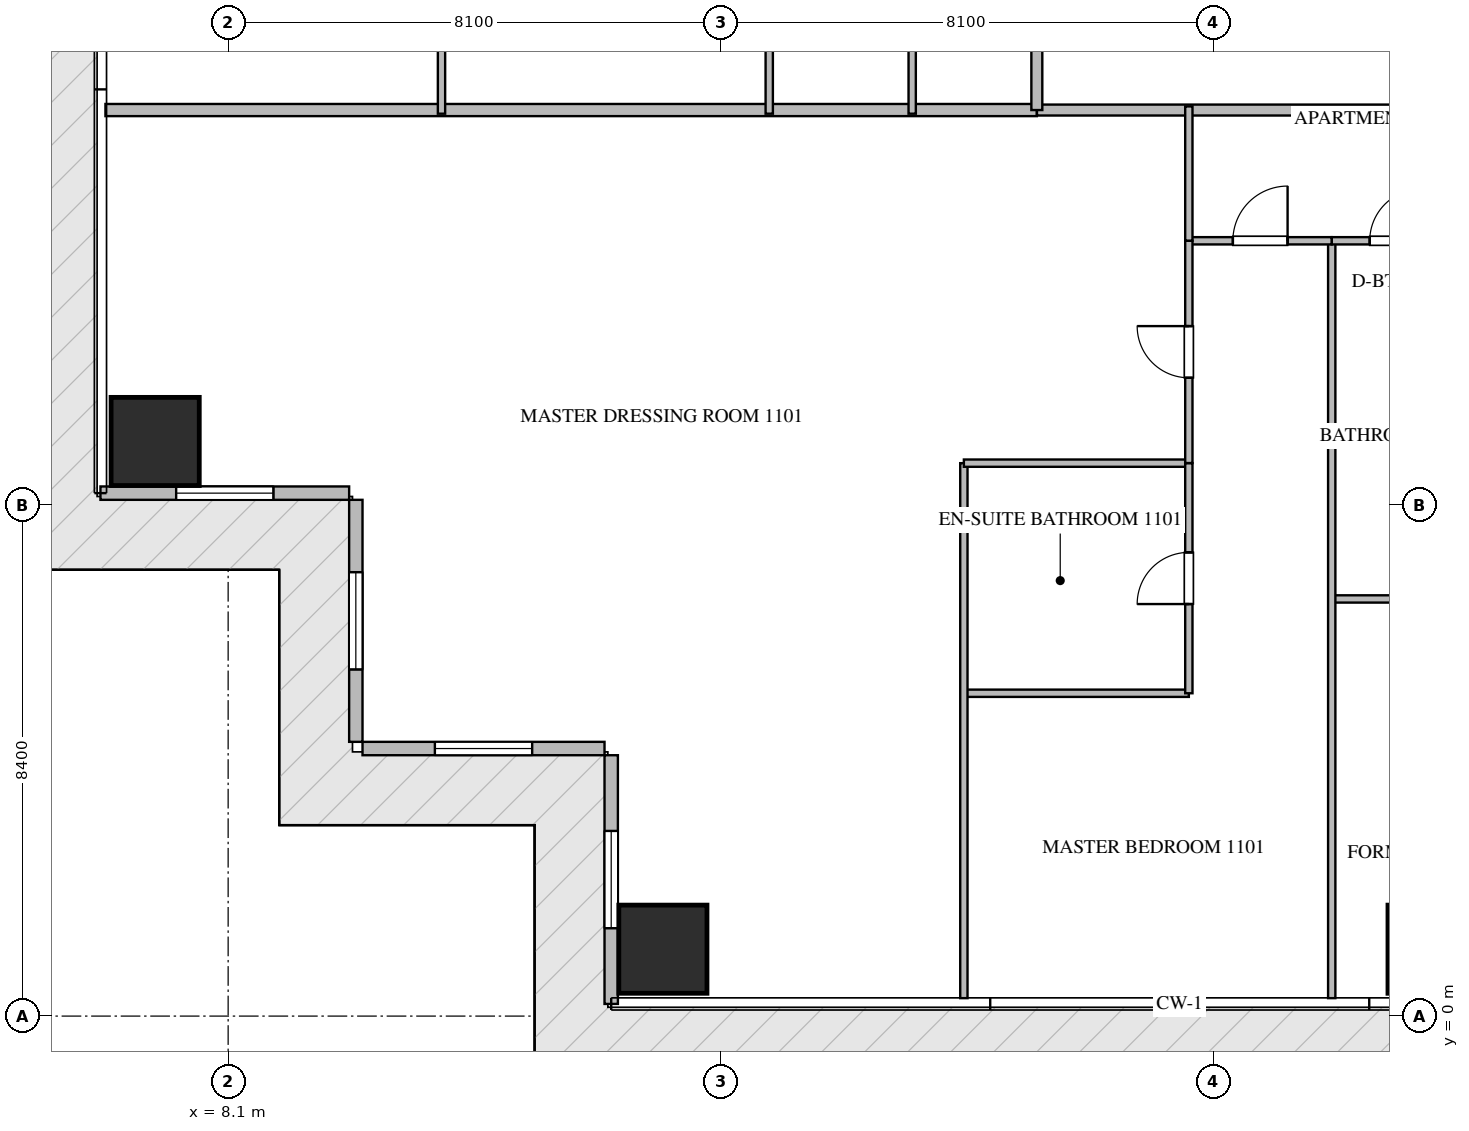
"""IFC4 building model, lengths in metres.
Left out: names, types, materials, properties, quantities, classifications, styles, units other than length and angle.
Written with IfcOpenShell. Run it as: python <this file> out.ifc"""

import sys

from ifc_helpers import new_model, si_unit, direction, frame, frame_2d, origin, origin_2d, place, context, subcontext, project, spatial, rectangle, extrude, source, transform, mapped, element, fill, save


model = new_model("IFC4")
c1 = context("Model", 3, precision=1e-05, world=origin(), true_north=direction((0.0, 1.0)))
c2 = subcontext(c1, "Body", "Model", "MODEL_VIEW")
j1 = project(units=[si_unit("LENGTHUNIT", "METRE"), si_unit("PLANEANGLEUNIT", "RADIAN")], contexts=[c1])
p1 = place(None, origin())
s1 = spatial("IfcSite", under=j1, at=p1, CompositionType="ELEMENT")
p2 = place(p1, origin())
s2 = spatial("IfcBuilding", under=s1, at=p2, CompositionType="ELEMENT")
p3 = place(p2, frame((0.0, 0.0, 49.2)))
s3 = spatial("IfcBuildingStorey", under=s2, at=p3, CompositionType="ELEMENT", Elevation=49.2)
m1 = source(origin(), c2, "Body", "SweptSolid", [
    extrude(rectangle(XDim=1.45, YDim=1.45, at=origin_2d()), origin(), (0.0, 0.0, 1.0), 3.75),
])
for number, where, z_axis, x_axis in (
    (1, (15.25, 1.1, -0.26), (0.0, 0.0, 1.0), (1.0, 0.0, 0.0)),
    (2, (27.9, 1.1, -0.26), (0.0, 0.0, 1.0), (1.0, 0.0, 0.0)),
    (3, (6.9, 9.45, -0.26), (0.0, 0.0, 1.0), (1.0, 0.0, 0.0)),
):
    element("IfcColumn", number, at=place(p3, frame(where, z_axis=z_axis, x_axis=x_axis)), inside=s3, PredefinedType="COLUMN", context=c2, shape_type="MappedRepresentation", body=[
        mapped(m1, transform((0.0, 0.0, 0.0), scale=1.0)),
    ])
p4 = place(p3, frame((6.0, 8.6, 0.0), z_axis=(0.0, 0.0, 1.0), x_axis=(1.0, 0.0, 0.0)))
e4 = element("IfcWall", 4, at=p4, inside=s3, PredefinedType="ELEMENTEDWALL", context=c2, shape_type="SweptSolid", body=[
    extrude(rectangle(XDim=4.09, YDim=0.22, at=frame_2d((2.045, 0.0))), origin(), (0.0, 0.0, 1.0), 3.475),
])
p5 = place(p4, frame((1.245, 0.0, 0.65)))
e5 = element("IfcOpeningElement", 5, at=p5, cuts=e4, PredefinedType="OPENING", context=c2, shape_type="SweptSolid", body=[
    extrude(rectangle(XDim=1.6, YDim=2.1, at=frame_2d((0.8, 1.05))), frame((0.0, 0.12, 0.0), z_axis=(0.0, -1.0, 0.0), x_axis=(1.0, 0.0, 0.0)), (0.0, 0.0, 1.0), 0.24),
])
p6 = place(p3, frame((10.2, 8.49, 0.0), z_axis=(0.0, 0.0, 1.0), x_axis=(0.0, -1.0, 0.0)))
e6 = element("IfcWall", 6, at=p6, inside=s3, PredefinedType="ELEMENTEDWALL", context=c2, shape_type="SweptSolid", body=[
    extrude(rectangle(XDim=3.98, YDim=0.22, at=frame_2d((1.99, 0.0))), origin(), (0.0, 0.0, 1.0), 3.475),
])
p7 = place(p6, frame((1.19, 0.0, 0.65)))
e7 = element("IfcOpeningElement", 7, at=p7, cuts=e6, PredefinedType="OPENING", context=c2, shape_type="SweptSolid", body=[
    extrude(rectangle(XDim=1.6, YDim=2.1, at=frame_2d((0.8, 1.05))), frame((0.0, 0.12, 0.0), z_axis=(0.0, -1.0, 0.0), x_axis=(1.0, 0.0, 0.0)), (0.0, 0.0, 1.0), 0.24),
])
p8 = place(p3, frame((10.31, 4.4, 0.0), z_axis=(0.0, 0.0, 1.0), x_axis=(1.0, 0.0, 0.0)))
e8 = element("IfcWall", 8, at=p8, inside=s3, PredefinedType="ELEMENTEDWALL", context=c2, shape_type="SweptSolid", body=[
    extrude(rectangle(XDim=3.98, YDim=0.22, at=frame_2d((1.99, 0.0))), origin(), (0.0, 0.0, 1.0), 3.475),
])
p9 = place(p8, frame((1.19, 0.0, 0.65)))
e9 = element("IfcOpeningElement", 9, at=p9, cuts=e8, PredefinedType="OPENING", context=c2, shape_type="SweptSolid", body=[
    extrude(rectangle(XDim=1.6, YDim=2.1, at=frame_2d((0.8, 1.05))), frame((0.0, 0.12, 0.0), z_axis=(0.0, -1.0, 0.0), x_axis=(1.0, 0.0, 0.0)), (0.0, 0.0, 1.0), 0.24),
])
p10 = place(p3, frame((14.4, 4.29, 0.0), z_axis=(0.0, 0.0, 1.0), x_axis=(0.0, -1.0, 0.0)))
e10 = element("IfcWall", 10, at=p10, inside=s3, PredefinedType="ELEMENTEDWALL", context=c2, shape_type="SweptSolid", body=[
    extrude(rectangle(XDim=4.09, YDim=0.22, at=frame_2d((2.045, 0.0))), origin(), (0.0, 0.0, 1.0), 3.475),
])
p11 = place(p10, frame((1.245, 0.0, 0.65)))
e11 = element("IfcOpeningElement", 11, at=p11, cuts=e10, PredefinedType="OPENING", context=c2, shape_type="SweptSolid", body=[
    extrude(rectangle(XDim=1.6, YDim=2.1, at=frame_2d((0.8, 1.05))), frame((0.0, 0.12, 0.0), z_axis=(0.0, -1.0, 0.0), x_axis=(1.0, 0.0, 0.0)), (0.0, 0.0, 1.0), 0.24),
])
p12 = place(p3, frame((6.082, 14.9, 0.0), z_axis=(0.0, 0.0, 1.0), x_axis=(1.0, 0.0, 0.0)))
e12 = element("IfcWall", 12, at=p12, inside=s3, PredefinedType="PARTITIONING", context=c2, shape_type="SweptSolid", body=[
    extrude(rectangle(XDim=15.318, YDim=0.2, at=frame_2d((7.659, 0.0))), origin(), (0.0, 0.0, 1.0), 3.49),
])
p13 = place(p3, frame((21.402, 14.9, 0.0), z_axis=(0.0, 0.0, 1.0), x_axis=(1.0, 0.0, 0.0)))
e13 = element("IfcWall", 13, at=p13, inside=s3, PredefinedType="PARTITIONING", context=c2, shape_type="SweptSolid", body=[
    extrude(rectangle(XDim=21.996, YDim=0.18, at=frame_2d((10.998, 0.0))), origin(), (0.0, 0.0, 1.0), 3.49),
])
p14 = place(p13, frame((15.222, 0.0, 0.0)))
e14 = element("IfcOpeningElement", 14, at=p14, cuts=e13, PredefinedType="OPENING", context=c2, shape_type="SweptSolid", body=[
    extrude(rectangle(XDim=1.0, YDim=2.15, at=frame_2d((0.5, 1.075))), frame((0.0, 0.1, 0.0), z_axis=(0.0, -1.0, 0.0), x_axis=(1.0, 0.0, 0.0)), (0.0, 0.0, 1.0), 0.2),
])
p15 = place(p3, frame((21.4, 14.9, 0.0), z_axis=(0.0, 0.0, 1.0), x_axis=(0.0, 1.0, 0.0)))
e15 = element("IfcWall", 15, at=p15, inside=s3, PredefinedType="PARTITIONING", context=c2, shape_type="SweptSolid", body=[
    extrude(rectangle(XDim=20.6, YDim=0.18, at=frame_2d((10.3, 0.0))), origin(), (0.0, 0.0, 1.0), 3.49),
])
p16 = place(p15, frame((8.8, 0.0, 0.0)))
e16 = element("IfcOpeningElement", 16, at=p16, cuts=e15, PredefinedType="OPENING", context=c2, shape_type="SweptSolid", body=[
    extrude(rectangle(XDim=1.0, YDim=2.15, at=frame_2d((0.5, 1.075))), frame((0.0, 0.1, 0.0), z_axis=(0.0, -1.0, 0.0), x_axis=(1.0, 0.0, 0.0)), (0.0, 0.0, 1.0), 0.2),
])
p17 = place(p15, frame((13.877, 0.0, 0.0)))
e17 = element("IfcOpeningElement", 17, at=p17, cuts=e15, PredefinedType="OPENING", context=c2, shape_type="SweptSolid", body=[
    extrude(rectangle(XDim=1.0, YDim=2.15, at=frame_2d((0.5, 1.075))), frame((0.0, 0.1, 0.0), z_axis=(0.0, -1.0, 0.0), x_axis=(1.0, 0.0, 0.0)), (0.0, 0.0, 1.0), 0.2),
])
p18 = place(p3, frame((26.25, 6.86, 0.0), z_axis=(0.0, 0.0, 1.0), x_axis=(1.0, 0.0, 0.0)))
e18 = element("IfcWall", 18, at=p18, inside=s3, PredefinedType="PARTITIONING", context=c2, shape_type="SweptSolid", body=[
    extrude(rectangle(XDim=5.15, YDim=0.12, at=frame_2d((2.575, 0.0))), origin(), (0.0, 0.0, 1.0), 3.49),
])
p19 = place(p3, frame((26.25, 0.295, 0.0), z_axis=(0.0, 0.0, 1.0), x_axis=(0.0, 1.0, 0.0)))
e19 = element("IfcWall", 19, at=p19, inside=s3, PredefinedType="PARTITIONING", context=c2, shape_type="SweptSolid", body=[
    extrude(rectangle(XDim=12.455, YDim=0.12, at=frame_2d((6.228, 0.0))), origin(), (0.0, 0.0, 1.0), 3.49),
])
p20 = place(p3, frame((26.25, 12.75, 0.0), z_axis=(0.0, 0.0, 1.0), x_axis=(1.0, 0.0, 0.0)))
e20 = element("IfcWall", 20, at=p20, inside=s3, PredefinedType="PARTITIONING", context=c2, shape_type="SweptSolid", body=[
    extrude(rectangle(XDim=2.1, YDim=0.12, at=frame_2d((1.05, 0.0))), origin(), (0.0, 0.0, 1.0), 3.49),
])
p21 = place(p20, frame((0.625, 0.0, 0.0)))
e21 = element("IfcOpeningElement", 21, at=p21, cuts=e20, PredefinedType="OPENING", context=c2, shape_type="SweptSolid", body=[
    extrude(rectangle(XDim=0.85, YDim=2.1, at=frame_2d((0.425, 1.05))), frame((0.0, 0.07, 0.0), z_axis=(0.0, -1.0, 0.0), x_axis=(1.0, 0.0, 0.0)), (0.0, 0.0, 1.0), 0.14),
])
p22 = place(p3, frame((23.9, 12.75, 0.0), z_axis=(0.0, 0.0, 1.0), x_axis=(1.0, 0.0, 0.0)))
e22 = element("IfcWall", 22, at=p22, inside=s3, PredefinedType="PARTITIONING", context=c2, shape_type="SweptSolid", body=[
    extrude(rectangle(XDim=2.348, YDim=0.12, at=frame_2d((1.174, 0.0))), origin(), (0.0, 0.0, 1.0), 3.49),
])
p23 = place(p22, frame((0.724, 0.0, 0.0)))
e23 = element("IfcOpeningElement", 23, at=p23, cuts=e22, PredefinedType="OPENING", context=c2, shape_type="SweptSolid", body=[
    extrude(rectangle(XDim=0.9, YDim=2.1, at=frame_2d((0.45, 1.05))), frame((0.0, 0.07, 0.0), z_axis=(0.0, -1.0, 0.0), x_axis=(1.0, 0.0, 0.0)), (0.0, 0.0, 1.0), 0.14),
])
p24 = place(p3, frame((20.2, 5.309, 0.0), z_axis=(0.0, 0.0, 1.0), x_axis=(1.0, 0.0, 0.0)))
e24 = element("IfcWall", 24, at=p24, inside=s3, PredefinedType="PARTITIONING", context=c2, shape_type="SweptSolid", body=[
    extrude(rectangle(XDim=3.7, YDim=0.12, at=frame_2d((1.85, 0.0))), origin(), (0.0, 0.0, 1.0), 3.49),
])
p25 = place(p3, frame((20.2, 0.295, 0.0), z_axis=(0.0, 0.0, 1.0), x_axis=(0.0, 1.0, 0.0)))
e25 = element("IfcWall", 25, at=p25, inside=s3, PredefinedType="PARTITIONING", context=c2, shape_type="SweptSolid", body=[
    extrude(rectangle(XDim=8.798, YDim=0.12, at=frame_2d((4.399, 0.0))), origin(), (0.0, 0.0, 1.0), 3.49),
])
p26 = place(p3, frame((20.2, 9.093, 0.0), z_axis=(0.0, 0.0, 1.0), x_axis=(1.0, 0.0, 0.0)))
e26 = element("IfcWall", 26, at=p26, inside=s3, PredefinedType="PARTITIONING", context=c2, shape_type="SweptSolid", body=[
    extrude(rectangle(XDim=3.7, YDim=0.12, at=frame_2d((1.85, 0.0))), origin(), (0.0, 0.0, 1.0), 3.49),
])
p27 = place(p3, frame((23.9, 5.309, 0.0), z_axis=(0.0, 0.0, 1.0), x_axis=(0.0, 1.0, 0.0)))
e27 = element("IfcWall", 27, at=p27, inside=s3, PredefinedType="PARTITIONING", context=c2, shape_type="SweptSolid", body=[
    extrude(rectangle(XDim=3.784, YDim=0.12, at=frame_2d((1.892, 0.0))), origin(), (0.0, 0.0, 1.0), 3.49),
])
p28 = place(p27, frame((1.467, 0.0, 0.0)))
e28 = element("IfcOpeningElement", 28, at=p28, cuts=e27, PredefinedType="OPENING", context=c2, shape_type="SweptSolid", body=[
    extrude(rectangle(XDim=0.85, YDim=2.1, at=frame_2d((0.425, 1.05))), frame((0.0, 0.07, 0.0), z_axis=(0.0, -1.0, 0.0), x_axis=(1.0, 0.0, 0.0)), (0.0, 0.0, 1.0), 0.14),
])
p29 = place(p3, frame((23.9, 9.095, 0.0), z_axis=(0.0, 0.0, 1.0), x_axis=(0.0, 1.0, 0.0)))
e29 = element("IfcWall", 29, at=p29, inside=s3, PredefinedType="PARTITIONING", context=c2, shape_type="SweptSolid", body=[
    extrude(rectangle(XDim=3.655, YDim=0.12, at=frame_2d((1.828, 0.0))), origin(), (0.0, 0.0, 1.0), 3.49),
])
p30 = place(p29, frame((1.402, 0.0, 0.0)))
e30 = element("IfcOpeningElement", 30, at=p30, cuts=e29, PredefinedType="OPENING", context=c2, shape_type="SweptSolid", body=[
    extrude(rectangle(XDim=0.85, YDim=2.1, at=frame_2d((0.425, 1.05))), frame((0.0, 0.07, 0.0), z_axis=(0.0, -1.0, 0.0), x_axis=(1.0, 0.0, 0.0)), (0.0, 0.0, 1.0), 0.14),
])
p31 = place(p3, frame((23.9, 12.752, 0.0), z_axis=(0.0, 0.0, 1.0), x_axis=(0.0, 1.0, 0.0)))
e31 = element("IfcWall", 31, at=p31, inside=s3, PredefinedType="PARTITIONING", context=c2, shape_type="SweptSolid", body=[
    extrude(rectangle(XDim=2.208, YDim=0.12, at=frame_2d((1.104, 0.0))), origin(), (0.0, 0.0, 1.0), 3.49),
])
for number, where, z_axis, x_axis in (
    (32, (11.609, 14.84, 0.0), (0.0, 0.0, 1.0), (0.0, 1.0, 0.0)),
    (33, (16.999, 14.84, 0.0), (0.0, 0.0, 1.0), (0.0, 1.0, 0.0)),
    (34, (19.35, 14.84, 0.0), (0.0, 0.0, 1.0), (0.0, 1.0, 0.0)),
):
    element("IfcWall", number, at=place(p3, frame(where, z_axis=z_axis, x_axis=x_axis)), inside=s3, PredefinedType="PARTITIONING", context=c2, shape_type="SweptSolid", body=[
        extrude(rectangle(XDim=7.76, YDim=0.12, at=frame_2d((3.88, 0.0))), origin(), (0.0, 0.0, 1.0), 3.49),
    ])
m2 = source(origin(), c2, "Body", "SweptSolid", [
    extrude(rectangle(XDim=1.6, YDim=2.1, at=frame_2d((0.8, 1.05))), frame((0.0, 0.03, 0.0), z_axis=(0.0, -1.0, 0.0), x_axis=(1.0, 0.0, 0.0)), (0.0, 0.0, 1.0), 0.06),
])
p32 = place(p5, origin())
e35 = element("IfcWindow", 35, at=p32, inside=s3, PartitioningType="SINGLE_PANEL", PredefinedType="WINDOW", context=c2, shape_type="MappedRepresentation", body=[
    mapped(m2, transform((0.0, 0.0, 0.0), scale=1.0)),
])
fill(e5, e35)
p33 = place(p7, origin())
e36 = element("IfcWindow", 36, at=p33, inside=s3, PartitioningType="SINGLE_PANEL", PredefinedType="WINDOW", context=c2, shape_type="MappedRepresentation", body=[
    mapped(m2, transform((0.0, 0.0, 0.0), scale=1.0)),
])
fill(e7, e36)
p34 = place(p9, origin())
e37 = element("IfcWindow", 37, at=p34, inside=s3, PartitioningType="SINGLE_PANEL", PredefinedType="WINDOW", context=c2, shape_type="MappedRepresentation", body=[
    mapped(m2, transform((0.0, 0.0, 0.0), scale=1.0)),
])
fill(e9, e37)
p35 = place(p11, origin())
e38 = element("IfcWindow", 38, at=p35, inside=s3, PartitioningType="SINGLE_PANEL", PredefinedType="WINDOW", context=c2, shape_type="MappedRepresentation", body=[
    mapped(m2, transform((0.0, 0.0, 0.0), scale=1.0)),
])
fill(e11, e38)
m3 = source(origin(), c2, "Body", "SweptSolid", [
    extrude(rectangle(XDim=0.85, YDim=2.1, at=frame_2d((0.425, 1.05))), frame((0.0, 0.025, 0.0), z_axis=(0.0, -1.0, 0.0), x_axis=(1.0, 0.0, 0.0)), (0.0, 0.0, 1.0), 0.05),
])
p36 = place(p21, origin())
e39 = element("IfcDoor", 39, at=p36, inside=s3, OperationType="SINGLE_SWING_RIGHT", PredefinedType="DOOR", context=c2, shape_type="MappedRepresentation", body=[
    mapped(m3, transform((0.0, 0.0, 0.0), scale=1.0)),
])
fill(e21, e39)
m4 = source(origin(), c2, "Body", "SweptSolid", [
    extrude(rectangle(XDim=0.9, YDim=2.1, at=frame_2d((0.45, 1.05))), frame((0.0, 0.025, 0.0), z_axis=(0.0, -1.0, 0.0), x_axis=(1.0, 0.0, 0.0)), (0.0, 0.0, 1.0), 0.05),
])
p37 = place(p23, origin())
e40 = element("IfcDoor", 40, at=p37, inside=s3, OperationType="SINGLE_SWING_RIGHT", PredefinedType="DOOR", context=c2, shape_type="MappedRepresentation", body=[
    mapped(m4, transform((0.0, 0.0, 0.0), scale=1.0)),
])
fill(e23, e40)
p38 = place(p28, origin())
e41 = element("IfcDoor", 41, at=p38, inside=s3, OperationType="SINGLE_SWING_LEFT", PredefinedType="DOOR", context=c2, shape_type="MappedRepresentation", body=[
    mapped(m3, transform((0.0, 0.0, 0.0), scale=1.0)),
])
fill(e28, e41)
p39 = place(p30, origin())
e42 = element("IfcDoor", 42, at=p39, inside=s3, OperationType="SINGLE_SWING_RIGHT", PredefinedType="DOOR", context=c2, shape_type="MappedRepresentation", body=[
    mapped(m3, transform((0.0, 0.0, 0.0), scale=1.0)),
])
fill(e30, e42)
save(model, sys.argv[1])
